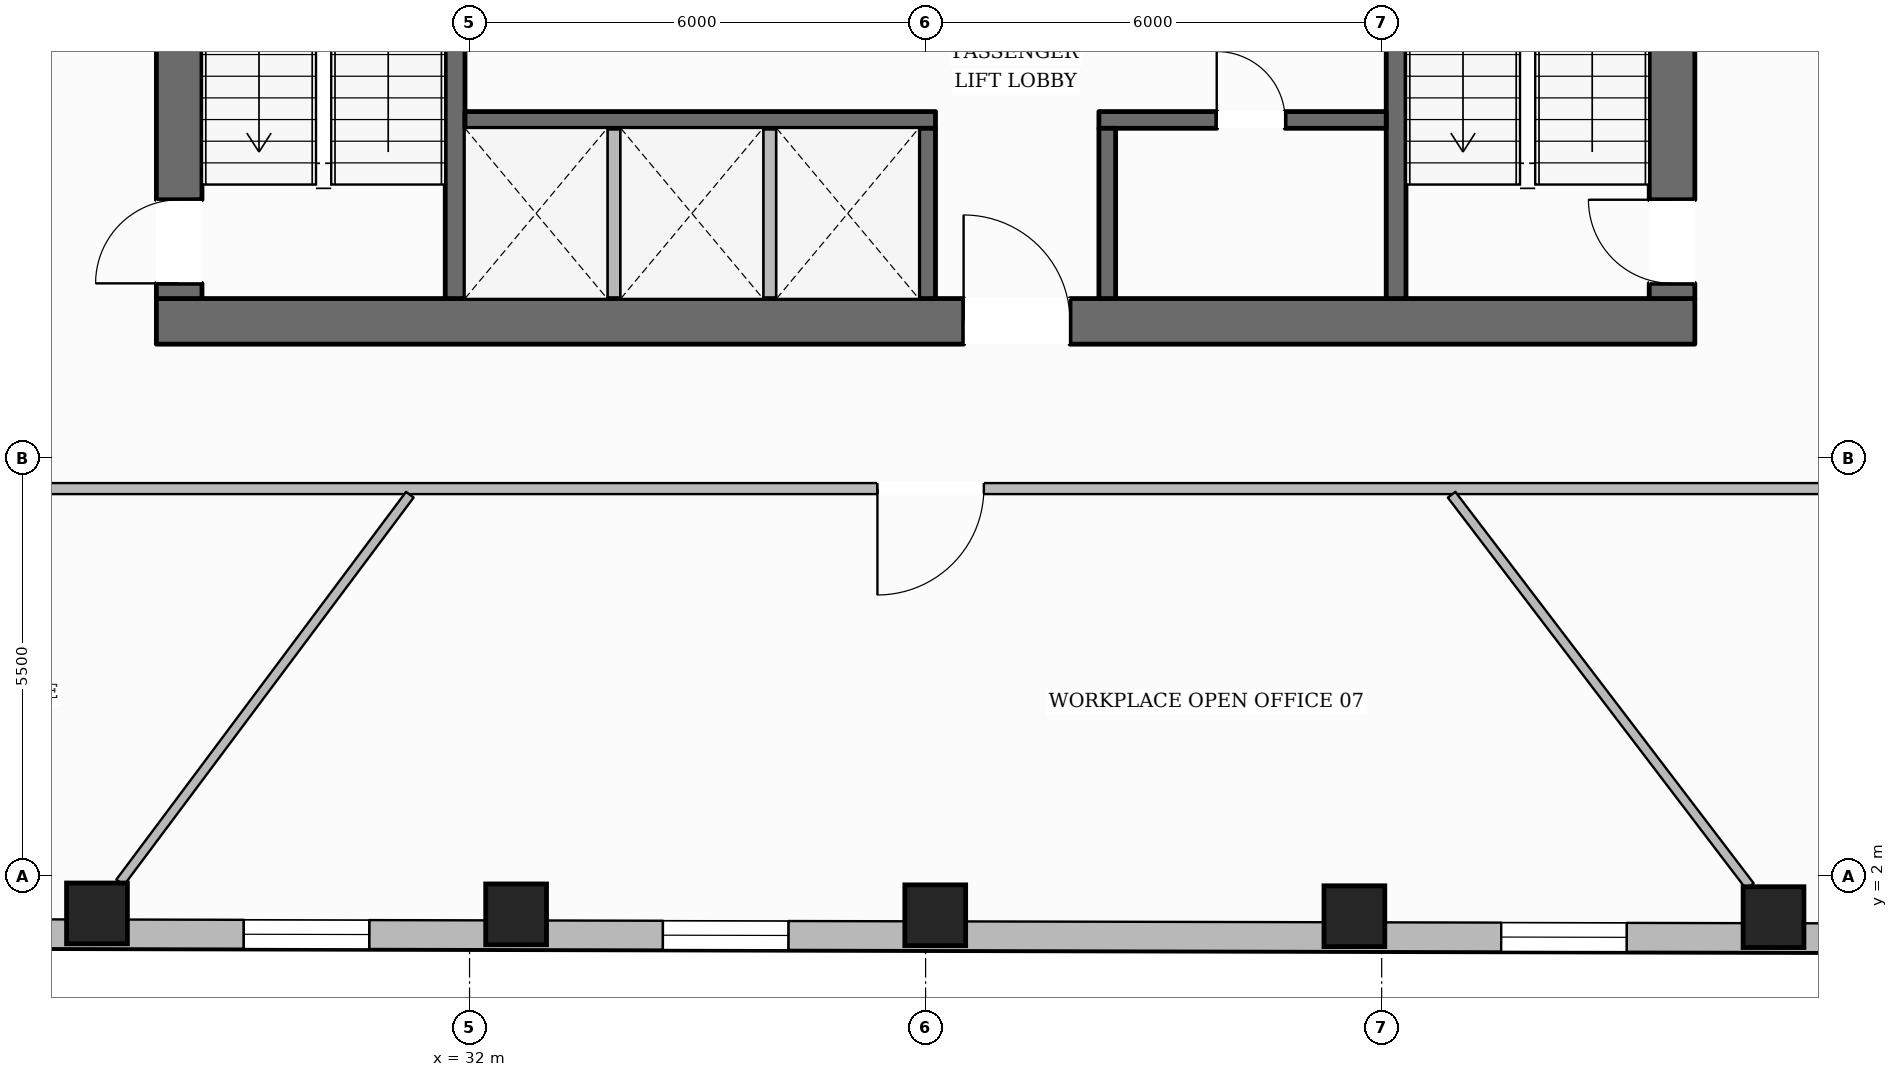
"""IFC4 building model, lengths in metres.
Left out: names, types, materials, properties, quantities, classifications, styles, units other than length and angle.
Written with IfcOpenShell. Run it as: python <this file> out.ifc"""

import sys

from ifc_helpers import new_model, si_unit, direction, frame, frame_2d, origin, origin_2d, place, context, subcontext, project, spatial, rectangle, hollow_rectangle, extrude, element, fill, save


model = new_model("IFC4")
c1 = context("Model", 3, precision=1e-05, world=origin(), true_north=direction((0.0, 1.0)))
c2 = subcontext(c1, "Body", "Model", "MODEL_VIEW")
j1 = project(units=[si_unit("LENGTHUNIT", "METRE"), si_unit("PLANEANGLEUNIT", "RADIAN")], contexts=[c1])
p1 = place(None, origin())
s1 = spatial("IfcSite", under=j1, at=p1, CompositionType="ELEMENT")
p2 = place(p1, origin())
s2 = spatial("IfcBuilding", under=s1, at=p2, CompositionType="ELEMENT")
p3 = place(p2, frame((0.0, 0.0, 32.95)))
s3 = spatial("IfcBuildingStorey", under=s2, at=p3, CompositionType="ELEMENT", Elevation=32.95)
p4 = place(p3, frame((27.88, 9.3, 0.0), z_axis=(0.0, 0.0, 1.0), x_axis=(1.0, 0.0, 0.0)))
e1 = element("IfcWall", 1, at=p4, inside=s3, PredefinedType="SOLIDWALL", context=c2, shape_type="SweptSolid", body=[
    extrude(rectangle(XDim=20.24, YDim=0.6, at=frame_2d((10.12, 0.0))), origin(), (0.0, 0.0, 1.0), 3.59),
])
p5 = place(p4, frame((10.62, 0.0, 0.0)))
e2 = element("IfcOpeningElement", 2, at=p5, cuts=e1, PredefinedType="OPENING", context=c2, shape_type="SweptSolid", body=[
    extrude(rectangle(XDim=1.4, YDim=2.2, at=frame_2d((0.7, 1.1))), frame((0.0, 0.31, 0.0), z_axis=(0.0, -1.0, 0.0), x_axis=(1.0, 0.0, 0.0)), (0.0, 0.0, 1.0), 0.62),
])
p6 = place(p3, frame((28.18, 9.6, 0.0), z_axis=(0.0, 0.0, 1.0), x_axis=(0.0, 1.0, 0.0)))
e3 = element("IfcWall", 3, at=p6, inside=s3, PredefinedType="SOLIDWALL", context=c2, shape_type="SweptSolid", body=[
    extrude(rectangle(XDim=13.0, YDim=0.6, at=frame_2d((6.5, 0.0))), origin(), (0.0, 0.0, 1.0), 3.59),
])
p7 = place(p6, frame((0.2, 0.0, 0.0)))
e4 = element("IfcOpeningElement", 4, at=p7, cuts=e3, PredefinedType="OPENING", context=c2, shape_type="SweptSolid", body=[
    extrude(rectangle(XDim=1.1, YDim=2.15, at=frame_2d((0.55, 1.075))), frame((0.0, 0.31, 0.0), z_axis=(0.0, -1.0, 0.0), x_axis=(1.0, 0.0, 0.0)), (0.0, 0.0, 1.0), 0.62),
])
p8 = place(p6, frame((8.4, 0.0, 0.0)))
e5 = element("IfcOpeningElement", 5, at=p8, cuts=e3, PredefinedType="OPENING", context=c2, shape_type="SweptSolid", body=[
    extrude(rectangle(XDim=0.9, YDim=2.1, at=frame_2d((0.45, 1.05))), frame((0.0, 0.31, 0.0), z_axis=(0.0, -1.0, 0.0), x_axis=(1.0, 0.0, 0.0)), (0.0, 0.0, 1.0), 0.62),
])
p9 = place(p3, frame((47.82, 9.6, 0.0), z_axis=(0.0, 0.0, 1.0), x_axis=(0.0, 1.0, 0.0)))
e6 = element("IfcWall", 6, at=p9, inside=s3, PredefinedType="SOLIDWALL", context=c2, shape_type="SweptSolid", body=[
    extrude(rectangle(XDim=13.0, YDim=0.6, at=frame_2d((6.5, 0.0))), origin(), (0.0, 0.0, 1.0), 3.59),
])
p10 = place(p9, frame((0.2, 0.0, 0.0)))
e7 = element("IfcOpeningElement", 7, at=p10, cuts=e6, PredefinedType="OPENING", context=c2, shape_type="SweptSolid", body=[
    extrude(rectangle(XDim=1.1, YDim=2.15, at=frame_2d((0.55, 1.075))), frame((0.0, 0.31, 0.0), z_axis=(0.0, -1.0, 0.0), x_axis=(1.0, 0.0, 0.0)), (0.0, 0.0, 1.0), 0.62),
])
p11 = place(p9, frame((8.4, 0.0, 0.0)))
e8 = element("IfcOpeningElement", 8, at=p11, cuts=e6, PredefinedType="OPENING", context=c2, shape_type="SweptSolid", body=[
    extrude(rectangle(XDim=0.9, YDim=2.1, at=frame_2d((0.45, 1.05))), frame((0.0, 0.31, 0.0), z_axis=(0.0, -1.0, 0.0), x_axis=(1.0, 0.0, 0.0)), (0.0, 0.0, 1.0), 0.62),
])
p12 = place(p3, frame((31.81, 9.6, 0.0), z_axis=(0.0, 0.0, 1.0), x_axis=(0.0, 1.0, 0.0)))
e9 = element("IfcWall", 9, at=p12, inside=s3, PredefinedType="SHEAR", context=c2, shape_type="SweptSolid", body=[
    extrude(rectangle(XDim=13.0, YDim=0.26, at=frame_2d((6.5, 0.0))), origin(), (0.0, 0.0, 1.0), 3.59),
])
p13 = place(p12, frame((10.925, 0.0, 0.0)))
e10 = element("IfcOpeningElement", 10, at=p13, cuts=e9, PredefinedType="OPENING", context=c2, shape_type="SweptSolid", body=[
    extrude(rectangle(XDim=1.25, YDim=2.25, at=frame_2d((0.625, 1.125))), frame((0.0, 0.14, 0.0), z_axis=(0.0, -1.0, 0.0), x_axis=(1.0, 0.0, 0.0)), (0.0, 0.0, 1.0), 0.28),
])
p14 = place(p3, frame((44.19, 9.6, 0.0), z_axis=(0.0, 0.0, 1.0), x_axis=(0.0, 1.0, 0.0)))
e11 = element("IfcWall", 11, at=p14, inside=s3, PredefinedType="SHEAR", context=c2, shape_type="SweptSolid", body=[
    extrude(rectangle(XDim=13.0, YDim=0.26, at=frame_2d((6.5, 0.0))), origin(), (0.0, 0.0, 1.0), 3.59),
])
p15 = place(p14, frame((10.925, 0.0, 0.0)))
e12 = element("IfcOpeningElement", 12, at=p15, cuts=e11, PredefinedType="OPENING", context=c2, shape_type="SweptSolid", body=[
    extrude(rectangle(XDim=1.25, YDim=2.25, at=frame_2d((0.625, 1.125))), frame((0.0, 0.14, 0.0), z_axis=(0.0, -1.0, 0.0), x_axis=(1.0, 0.0, 0.0)), (0.0, 0.0, 1.0), 0.28),
])
p16 = place(p3, frame((31.94, 11.95, 0.0), z_axis=(0.0, 0.0, 1.0), x_axis=(1.0, 0.0, 0.0)))
e13 = element("IfcWall", 13, at=p16, inside=s3, PredefinedType="SOLIDWALL", context=c2, shape_type="SweptSolid", body=[
    extrude(rectangle(XDim=6.19, YDim=0.22, at=frame_2d((3.095, 0.0))), origin(), (0.0, 0.0, 1.0), 3.59),
])
p17 = place(p3, frame((40.28, 11.95, 0.0), z_axis=(0.0, 0.0, 1.0), x_axis=(1.0, 0.0, 0.0)))
e14 = element("IfcWall", 14, at=p17, inside=s3, PredefinedType="SOLIDWALL", context=c2, shape_type="SweptSolid", body=[
    extrude(rectangle(XDim=3.78, YDim=0.22, at=frame_2d((1.89, 0.0))), origin(), (0.0, 0.0, 1.0), 3.59),
])
p18 = place(p17, frame((1.55, 0.0, 0.0)))
e15 = element("IfcOpeningElement", 15, at=p18, cuts=e14, PredefinedType="OPENING", context=c2, shape_type="SweptSolid", body=[
    extrude(rectangle(XDim=0.9, YDim=2.1, at=frame_2d((0.45, 1.05))), frame((0.0, 0.12, 0.0), z_axis=(0.0, -1.0, 0.0), x_axis=(1.0, 0.0, 0.0)), (0.0, 0.0, 1.0), 0.24),
])
for number, where, z_axis, x_axis in (
    (16, (38.02, 9.6, 0.0), (0.0, 0.0, 1.0), (0.0, 1.0, 0.0)),
    (17, (40.39, 9.6, 0.0), (0.0, 0.0, 1.0), (0.0, 1.0, 0.0)),
):
    element("IfcWall", number, at=place(p3, frame(where, z_axis=z_axis, x_axis=x_axis)), inside=s3, PredefinedType="SOLIDWALL", context=c2, shape_type="SweptSolid", body=[
        extrude(rectangle(XDim=2.24, YDim=0.22, at=frame_2d((1.12, 0.0))), origin(), (0.0, 0.0, 1.0), 3.59),
    ])
for number, where, z_axis, x_axis in (
    (18, (27.098, 1.511, 0.0), (0.0, 0.0, 1.0), (1.0, 0.0, 0.0)),
    (19, (32.613, 1.499, 0.0), (0.0, 0.0, 1.0), (1.0, 0.0, 0.0)),
    (20, (38.127, 1.487, 0.0), (0.0, 0.0, 1.0), (1.0, 0.0, 0.0)),
    (21, (43.641, 1.474, 0.0), (0.0, 0.0, 1.0), (1.0, 0.0, 0.0)),
    (22, (49.155, 1.462, 0.0), (0.0, 0.0, 1.0), (1.0, 0.0, 0.0)),
):
    element("IfcColumn", number, at=place(p3, frame(where, z_axis=z_axis, x_axis=x_axis)), inside=s3, PredefinedType="COLUMN", context=c2, shape_type="SweptSolid", body=[
        extrude(hollow_rectangle(XDim=0.8, YDim=0.8, WallThickness=0.036, at=origin_2d()), origin(), (0.0, 0.0, 1.0), 3.59),
    ])
p19 = place(p3, frame((55.149, 1.179, 0.0), z_axis=(0.0, 0.0, 1.0), x_axis=(-0.999997528713, 0.002223188878, 0.0)))
e23 = element("IfcWall", 23, at=p19, inside=s3, PredefinedType="STANDARD", context=c2, shape_type="SweptSolid", body=[
    extrude(rectangle(XDim=34.043, YDim=0.38, at=frame_2d((17.021, 0.0))), origin(), (0.0, 0.0, 1.0), 2.97),
])
p20 = place(p19, frame((29.983, 0.0, 0.65)))
e24 = element("IfcOpeningElement", 24, at=p20, cuts=e23, PredefinedType="OPENING", context=c2, shape_type="SweptSolid", body=[
    extrude(rectangle(XDim=1.65, YDim=1.75, at=frame_2d((0.825, 0.875))), frame((0.0, 0.2, 0.0), z_axis=(0.0, -1.0, 0.0), x_axis=(1.0, 0.0, 0.0)), (0.0, 0.0, 1.0), 0.4),
])
p21 = place(p19, frame((24.469, 0.0, 0.65)))
e25 = element("IfcOpeningElement", 25, at=p21, cuts=e23, PredefinedType="OPENING", context=c2, shape_type="SweptSolid", body=[
    extrude(rectangle(XDim=1.65, YDim=1.75, at=frame_2d((0.825, 0.875))), frame((0.0, 0.2, 0.0), z_axis=(0.0, -1.0, 0.0), x_axis=(1.0, 0.0, 0.0)), (0.0, 0.0, 1.0), 0.4),
])
p22 = place(p19, frame((18.955, 0.0, 0.65)))
e26 = element("IfcOpeningElement", 26, at=p22, cuts=e23, PredefinedType="OPENING", context=c2, shape_type="SweptSolid", body=[
    extrude(rectangle(XDim=1.65, YDim=1.75, at=frame_2d((0.825, 0.875))), frame((0.0, 0.2, 0.0), z_axis=(0.0, -1.0, 0.0), x_axis=(1.0, 0.0, 0.0)), (0.0, 0.0, 1.0), 0.4),
])
p23 = place(p19, frame((7.926, 0.0, 0.65)))
e27 = element("IfcOpeningElement", 27, at=p23, cuts=e23, PredefinedType="OPENING", context=c2, shape_type="SweptSolid", body=[
    extrude(rectangle(XDim=1.65, YDim=1.75, at=frame_2d((0.825, 0.875))), frame((0.0, 0.2, 0.0), z_axis=(0.0, -1.0, 0.0), x_axis=(1.0, 0.0, 0.0)), (0.0, 0.0, 1.0), 0.4),
])
p24 = place(p19, frame((2.412, 0.0, 0.65)))
e28 = element("IfcOpeningElement", 28, at=p24, cuts=e23, PredefinedType="OPENING", context=c2, shape_type="SweptSolid", body=[
    extrude(rectangle(XDim=1.65, YDim=1.75, at=frame_2d((0.825, 0.875))), frame((0.0, 0.2, 0.0), z_axis=(0.0, -1.0, 0.0), x_axis=(1.0, 0.0, 0.0)), (0.0, 0.0, 1.0), 0.4),
])
for number, where, z_axis, x_axis in (
    (29, (33.9, 9.6, 0.0), (0.0, 0.0, 1.0), (0.0, 1.0, 0.0)),
    (30, (35.95, 9.6, 0.0), (0.0, 0.0, 1.0), (0.0, 1.0, 0.0)),
):
    element("IfcWall", number, at=place(p3, frame(where, z_axis=z_axis, x_axis=x_axis)), inside=s3, PredefinedType="PARTITIONING", context=c2, shape_type="SweptSolid", body=[
        extrude(rectangle(XDim=2.24, YDim=0.165, at=frame_2d((1.12, 0.0))), origin(), (0.0, 0.0, 1.0), 3.59),
    ])
p25 = place(p3, frame((49.92, 7.1, 0.0), z_axis=(0.0, 0.0, 1.0), x_axis=(-1.0, 0.0, 0.0)))
e31 = element("IfcWall", 31, at=p25, inside=s3, PredefinedType="PARTITIONING", context=c2, shape_type="SweptSolid", body=[
    extrude(rectangle(XDim=23.84, YDim=0.145, at=frame_2d((11.92, 0.0))), origin(), (0.0, 0.0, 1.0), 3.278),
])
p26 = place(p25, frame((11.154, 0.0, 0.0)))
e32 = element("IfcOpeningElement", 32, at=p26, cuts=e31, PredefinedType="OPENING", context=c2, shape_type="SweptSolid", body=[
    extrude(rectangle(XDim=1.4, YDim=2.2, at=frame_2d((0.7, 1.1))), frame((0.0, 0.083, 0.0), z_axis=(0.0, -1.0, 0.0), x_axis=(1.0, 0.0, 0.0)), (0.0, 0.0, 1.0), 0.165),
])
p27 = place(p3, frame((31.215, 7.02, 0.0), z_axis=(0.0, 0.0, 1.0), x_axis=(-0.598618740795, -0.80103408365, 0.0)))
e33 = element("IfcWall", 33, at=p27, inside=s3, PredefinedType="PARTITIONING", context=c2, shape_type="SweptSolid", body=[
    extrude(rectangle(XDim=6.367, YDim=0.125, at=frame_2d((3.184, 0.0))), origin(), (0.0, 0.0, 1.0), 3.59),
])
p28 = place(p3, frame((44.92, 7.02, 0.0), z_axis=(0.0, 0.0, 1.0), x_axis=(0.606136374811, -0.795360732706, 0.0)))
e34 = element("IfcWall", 34, at=p28, inside=s3, PredefinedType="PARTITIONING", context=c2, shape_type="SweptSolid", body=[
    extrude(rectangle(XDim=6.474, YDim=0.125, at=frame_2d((3.237, 0.0))), origin(), (0.0, 0.0, 1.0), 3.59),
])
p29 = place(p21, origin())
e35 = element("IfcWindow", 35, at=p29, inside=s3, PartitioningType="SINGLE_PANEL", PredefinedType="WINDOW", context=c2, shape_type="SweptSolid", body=[
    extrude(rectangle(XDim=1.65, YDim=1.75, at=frame_2d((0.825, 0.875))), frame((0.0, 0.03, 0.0), z_axis=(0.0, -1.0, 0.0), x_axis=(1.0, 0.0, 0.0)), (0.0, 0.0, 1.0), 0.06),
])
fill(e25, e35)
p30 = place(p22, origin())
e36 = element("IfcWindow", 36, at=p30, inside=s3, PartitioningType="SINGLE_PANEL", PredefinedType="WINDOW", context=c2, shape_type="SweptSolid", body=[
    extrude(rectangle(XDim=1.65, YDim=1.75, at=frame_2d((0.825, 0.875))), frame((0.0, 0.03, 0.0), z_axis=(0.0, -1.0, 0.0), x_axis=(1.0, 0.0, 0.0)), (0.0, 0.0, 1.0), 0.06),
])
fill(e26, e36)
p31 = place(p23, origin())
e37 = element("IfcWindow", 37, at=p31, inside=s3, PartitioningType="SINGLE_PANEL", PredefinedType="WINDOW", context=c2, shape_type="SweptSolid", body=[
    extrude(rectangle(XDim=1.65, YDim=1.75, at=frame_2d((0.825, 0.875))), frame((0.0, 0.03, 0.0), z_axis=(0.0, -1.0, 0.0), x_axis=(1.0, 0.0, 0.0)), (0.0, 0.0, 1.0), 0.06),
])
fill(e27, e37)
p32 = place(p7, origin())
e38 = element("IfcDoor", 38, at=p32, inside=s3, OperationType="SINGLE_SWING_LEFT", PredefinedType="DOOR", context=c2, shape_type="SweptSolid", body=[
    extrude(rectangle(XDim=1.1, YDim=2.15, at=frame_2d((0.55, 1.075))), frame((0.0, 0.025, 0.0), z_axis=(0.0, -1.0, 0.0), x_axis=(1.0, 0.0, 0.0)), (0.0, 0.0, 1.0), 0.05),
])
fill(e4, e38)
p33 = place(p10, origin())
e39 = element("IfcDoor", 39, at=p33, inside=s3, OperationType="SINGLE_SWING_RIGHT", PredefinedType="DOOR", context=c2, shape_type="SweptSolid", body=[
    extrude(rectangle(XDim=1.1, YDim=2.15, at=frame_2d((0.55, 1.075))), frame((0.0, 0.025, 0.0), z_axis=(0.0, -1.0, 0.0), x_axis=(1.0, 0.0, 0.0)), (0.0, 0.0, 1.0), 0.05),
])
fill(e7, e39)
p34 = place(p5, origin())
e40 = element("IfcDoor", 40, at=p34, inside=s3, OperationType="SINGLE_SWING_LEFT", PredefinedType="DOOR", context=c2, shape_type="SweptSolid", body=[
    extrude(rectangle(XDim=1.4, YDim=2.2, at=frame_2d((0.7, 1.1))), frame((0.0, 0.025, 0.0), z_axis=(0.0, -1.0, 0.0), x_axis=(1.0, 0.0, 0.0)), (0.0, 0.0, 1.0), 0.05),
])
fill(e2, e40)
p35 = place(p18, origin())
e41 = element("IfcDoor", 41, at=p35, inside=s3, OperationType="SINGLE_SWING_LEFT", PredefinedType="DOOR", context=c2, shape_type="SweptSolid", body=[
    extrude(rectangle(XDim=0.9, YDim=2.1, at=frame_2d((0.45, 1.05))), frame((0.0, 0.025, 0.0), z_axis=(0.0, -1.0, 0.0), x_axis=(1.0, 0.0, 0.0)), (0.0, 0.0, 1.0), 0.05),
])
fill(e15, e41)
p36 = place(p26, origin())
e42 = element("IfcDoor", 42, at=p36, inside=s3, OperationType="SINGLE_SWING_RIGHT", PredefinedType="DOOR", context=c2, shape_type="SweptSolid", body=[
    extrude(rectangle(XDim=1.4, YDim=2.2, at=frame_2d((0.7, 1.1))), frame((0.0, 0.025, 0.0), z_axis=(0.0, -1.0, 0.0), x_axis=(1.0, 0.0, 0.0)), (0.0, 0.0, 1.0), 0.05),
])
fill(e32, e42)
save(model, sys.argv[1])
